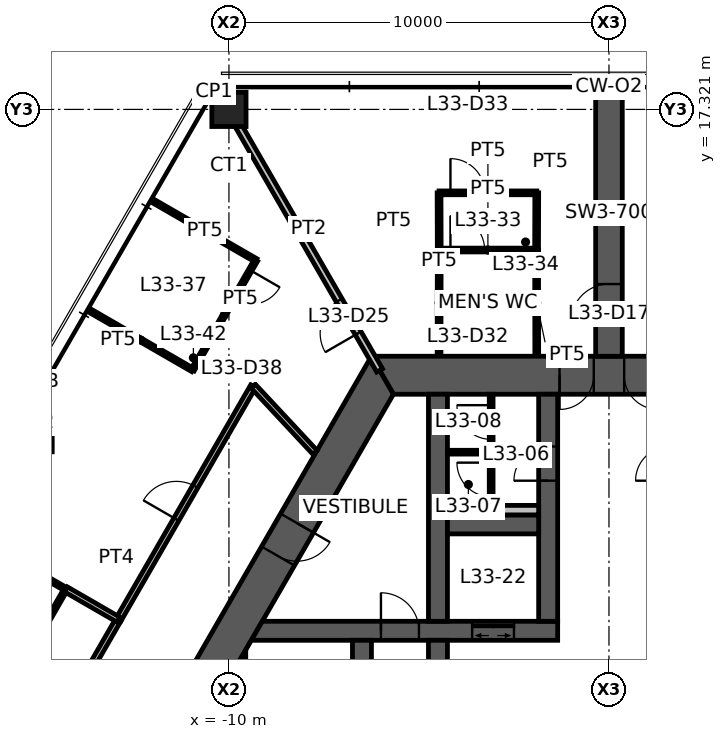
"""IFC4 building model, lengths in metres.
Left out: names, types, materials, properties, quantities, classifications, styles, units other than length and angle.
Written with IfcOpenShell. Run it as: python <this file> out.ifc"""

import sys

from ifc_helpers import new_model, si_unit, direction, frame, frame_2d, origin, origin_2d, place, context, subcontext, project, spatial, polyline, rectangle, hollow_rectangle, outline, extrude, element, fill, save


model = new_model("IFC4")
c1 = context("Model", 3, precision=1e-05, world=origin(), true_north=direction((0.0, 1.0)))
c2 = subcontext(c1, "Body", "Model", "MODEL_VIEW")
j1 = project(units=[si_unit("LENGTHUNIT", "METRE"), si_unit("PLANEANGLEUNIT", "RADIAN")], contexts=[c1])
p1 = place(None, origin())
s1 = spatial("IfcSite", under=j1, at=p1, CompositionType="ELEMENT")
p2 = place(p1, origin())
s2 = spatial("IfcBuilding", under=s1, at=p2, CompositionType="ELEMENT")
p3 = place(p2, frame((0.0, 0.0, 133.1)))
s3 = spatial("IfcBuildingStorey", under=s2, at=p3, CompositionType="ELEMENT", Elevation=133.1)
p4 = place(p3, frame((-10.0, 17.321, 0.0), z_axis=(0.0, 0.0, 1.0), x_axis=(1.0, 0.0, 0.0)))
e1 = element("IfcColumn", 1, at=p4, inside=s3, PredefinedType="COLUMN", context=c2, shape_type="SweptSolid", body=[
    extrude(hollow_rectangle(XDim=0.9, YDim=0.9, WallThickness=0.07, at=origin_2d()), origin(), (0.0, 0.0, 1.0), 3.9),
])
p5 = place(p3, frame((5.961, 10.325, 0.0), z_axis=(0.0, 0.0, 1.0), x_axis=(-1.0, 0.0, 0.0)))
e2 = element("IfcWall", 2, at=p5, inside=s3, PredefinedType="SHEAR", context=c2, shape_type="SweptSolid", body=[
    extrude(outline(polyline([(-0.289, -0.5), (4.661, -0.5), (5.561, -0.5), (6.361, -0.5), (7.261, -0.5), (12.211, -0.5), (11.634, 0.5), (7.261, 0.5), (6.361, 0.5), (5.561, 0.5), (4.661, 0.5), (0.289, 0.5), (-0.289, -0.5)])), origin(), (0.0, 0.0, 1.0), 3.9),
])
p6 = place(p5, frame((6.361, 0.0, 0.0)))
e3 = element("IfcOpeningElement", 3, at=p6, cuts=e2, PredefinedType="OPENING", context=c2, shape_type="SweptSolid", body=[
    extrude(rectangle(XDim=0.9, YDim=2.1, at=frame_2d((0.45, 1.05))), frame((0.0, 0.51, 0.0), z_axis=(0.0, -1.0, 0.0), x_axis=(1.0, 0.0, 0.0)), (0.0, 0.0, 1.0), 1.02),
])
p7 = place(p5, frame((4.661, 0.0, 0.0)))
e4 = element("IfcOpeningElement", 4, at=p7, cuts=e2, PredefinedType="OPENING", context=c2, shape_type="SweptSolid", body=[
    extrude(rectangle(XDim=0.9, YDim=2.1, at=frame_2d((0.45, 1.05))), frame((0.0, 0.51, 0.0), z_axis=(0.0, -1.0, 0.0), x_axis=(1.0, 0.0, 0.0)), (0.0, 0.0, 1.0), 1.02),
])
p8 = place(p3, frame((-5.961, 10.325, 0.0), z_axis=(0.0, 0.0, 1.0), x_axis=(-0.500004296715, -0.866022923061, 0.0)))
e5 = element("IfcWall", 5, at=p8, inside=s3, PredefinedType="SHEAR", context=c2, shape_type="SweptSolid", body=[
    extrude(outline(polyline([(-0.289, -0.5), (4.494, -0.5), (5.494, -0.5), (12.211, -0.5), (11.634, 0.5), (5.494, 0.5), (4.494, 0.5), (0.289, 0.5), (-0.289, -0.5)])), origin(), (0.0, 0.0, 1.0), 3.9),
])
p9 = place(p8, frame((4.494, 0.0, 0.0)))
e6 = element("IfcOpeningElement", 6, at=p9, cuts=e5, PredefinedType="OPENING", context=c2, shape_type="SweptSolid", body=[
    extrude(rectangle(XDim=1.0, YDim=2.1, at=frame_2d((0.5, 1.05))), frame((0.0, 0.51, 0.0), z_axis=(0.0, -1.0, 0.0), x_axis=(1.0, 0.0, 0.0)), (0.0, 0.0, 1.0), 1.02),
])
p10 = place(p3, frame((0.0, 10.825, 0.0), z_axis=(0.0, 0.0, 1.0), x_axis=(0.0, 1.0, 0.0)))
e7 = element("IfcWall", 7, at=p10, inside=s3, PredefinedType="SHEAR", context=c2, shape_type="SweptSolid", body=[
    extrude(rectangle(XDim=6.946, YDim=0.7, at=frame_2d((3.473, 0.0))), origin(), (0.0, 0.0, 1.0), 3.9),
])
p11 = place(p10, frame((0.9, 0.0, 0.0)))
e8 = element("IfcOpeningElement", 8, at=p11, cuts=e7, PredefinedType="OPENING", context=c2, shape_type="SweptSolid", body=[
    extrude(rectangle(XDim=1.0, YDim=2.1, at=frame_2d((0.5, 1.05))), frame((0.0, 0.36, 0.0), z_axis=(0.0, -1.0, 0.0), x_axis=(1.0, 0.0, 0.0)), (0.0, 0.0, 1.0), 0.72),
])
p12 = place(p3, frame((-9.266, 3.6, 0.0), z_axis=(0.0, 0.0, 1.0), x_axis=(1.0, 0.0, 0.0)))
e9 = element("IfcWall", 9, at=p12, inside=s3, PredefinedType="SHEAR", context=c2, shape_type="SweptSolid", body=[
    extrude(outline(polyline([(-0.144, -0.25), (3.266, -0.25), (4.266, -0.25), (5.667, -0.25), (6.767, -0.25), (7.916, -0.25), (7.916, 0.25), (6.767, 0.25), (5.667, 0.25), (4.266, 0.25), (3.266, 0.25), (0.144, 0.25), (-0.144, -0.25)])), origin(), (0.0, 0.0, 1.0), 3.9),
])
p13 = place(p12, frame((3.266, 0.0, 0.0)))
e10 = element("IfcOpeningElement", 10, at=p13, cuts=e9, PredefinedType="OPENING", context=c2, shape_type="SweptSolid", body=[
    extrude(rectangle(XDim=1.0, YDim=2.1, at=frame_2d((0.5, 1.05))), frame((0.0, 0.26, 0.0), z_axis=(0.0, -1.0, 0.0), x_axis=(1.0, 0.0, 0.0)), (0.0, 0.0, 1.0), 0.52),
])
p14 = place(p12, frame((5.667, 0.0, 0.0)))
e11 = element("IfcOpeningElement", 11, at=p14, cuts=e9, PredefinedType="OPENING", context=c2, shape_type="SweptSolid", body=[
    extrude(rectangle(XDim=1.1, YDim=2.1, at=frame_2d((0.55, 1.05))), frame((0.0, 0.26, 0.0), z_axis=(0.0, -1.0, 0.0), x_axis=(1.0, 0.0, 0.0)), (0.0, 0.0, 1.0), 0.52),
])
p15 = place(p3, frame((-1.6, 3.85, 0.0), z_axis=(0.0, 0.0, 1.0), x_axis=(0.0, 1.0, 0.0)))
e12 = element("IfcWall", 12, at=p15, inside=s3, PredefinedType="SHEAR", context=c2, shape_type="SweptSolid", body=[
    extrude(rectangle(XDim=5.975, YDim=0.5, at=frame_2d((2.987, 0.0))), origin(), (0.0, 0.0, 1.0), 3.9),
])
p16 = place(p15, frame((3.7, 0.0, 0.0)))
e13 = element("IfcOpeningElement", 13, at=p16, cuts=e12, PredefinedType="OPENING", context=c2, shape_type="SweptSolid", body=[
    extrude(rectangle(XDim=0.9, YDim=2.1, at=frame_2d((0.45, 1.05))), frame((0.0, 0.26, 0.0), z_axis=(0.0, -1.0, 0.0), x_axis=(1.0, 0.0, 0.0)), (0.0, 0.0, 1.0), 0.52),
])
p17 = place(p3, frame((-4.5, -3.35, 0.0), z_axis=(0.0, 0.0, 1.0), x_axis=(0.0, 1.0, 0.0)))
e14 = element("IfcWall", 14, at=p17, inside=s3, PredefinedType="SHEAR", context=c2, shape_type="SweptSolid", body=[
    extrude(rectangle(XDim=6.7, YDim=0.5, at=frame_2d((3.35, 0.0))), origin(), (0.0, 0.0, 1.0), 3.9),
])
p18 = place(p17, frame((2.85, 0.0, 0.0)))
e15 = element("IfcOpeningElement", 15, at=p18, cuts=e14, PredefinedType="OPENING", context=c2, shape_type="SweptSolid", body=[
    extrude(rectangle(XDim=1.0, YDim=2.1, at=frame_2d((0.5, 1.05))), frame((0.0, 0.26, 0.0), z_axis=(0.0, -1.0, 0.0), x_axis=(1.0, 0.0, 0.0)), (0.0, 0.0, 1.0), 0.52),
])
p19 = place(p3, frame((-6.5, -3.35, 0.0), z_axis=(0.0, 0.0, 1.0), x_axis=(0.0, 1.0, 0.0)))
e16 = element("IfcWall", 16, at=p19, inside=s3, PredefinedType="SHEAR", context=c2, shape_type="SweptSolid", body=[
    extrude(rectangle(XDim=6.7, YDim=0.5, at=frame_2d((3.35, 0.0))), origin(), (0.0, 0.0, 1.0), 3.9),
])
p20 = place(p19, frame((0.1, 0.0, 0.0)))
e17 = element("IfcOpeningElement", 17, at=p20, cuts=e16, PredefinedType="OPENING", context=c2, shape_type="SweptSolid", body=[
    extrude(rectangle(XDim=1.0, YDim=2.1, at=frame_2d((0.5, 1.05))), frame((0.0, 0.26, 0.0), z_axis=(0.0, -1.0, 0.0), x_axis=(1.0, 0.0, 0.0)), (0.0, 0.0, 1.0), 0.52),
])
p21 = place(p3, frame((-4.5, 3.85, 0.0), z_axis=(0.0, 0.0, 1.0), x_axis=(0.0, 1.0, 0.0)))
e18 = element("IfcWall", 18, at=p21, inside=s3, PredefinedType="SHEAR", context=c2, shape_type="SweptSolid", body=[
    extrude(rectangle(XDim=5.975, YDim=0.5, at=frame_2d((2.987, 0.0))), origin(), (0.0, 0.0, 1.0), 3.9),
])
p22 = place(p3, frame((-4.25, 6.4, 0.0), z_axis=(0.0, 0.0, 1.0), x_axis=(1.0, 0.0, 0.0)))
e19 = element("IfcWall", 19, at=p22, inside=s3, PredefinedType="SHEAR", context=c2, shape_type="SweptSolid", body=[
    extrude(rectangle(XDim=2.4, YDim=0.5, at=frame_2d((1.2, 0.0))), origin(), (0.0, 0.0, 1.0), 3.9),
])
p23 = place(p3, frame((-9.808, -2.662, 0.0), z_axis=(0.0, 0.0, 1.0), x_axis=(0.0, 1.0, 0.0)))
e20 = element("IfcWall", 20, at=p23, inside=s3, PredefinedType="SHEAR", context=c2, shape_type="SweptSolid", body=[
    extrude(outline(polyline([(-0.433, -0.25), (5.758, -0.25), (4.892, 0.25), (0.433, 0.25), (-0.433, -0.25)])), origin(), (0.0, 0.0, 1.0), 3.9),
])
p24 = place(p3, frame((-4.25, 6.775, 0.0), z_axis=(0.0, 0.0, 1.0), x_axis=(1.0, 0.0, 0.0)))
e21 = element("IfcWall", 21, at=p24, inside=s3, PredefinedType="PLUMBINGWALL", context=c2, shape_type="SweptSolid", body=[
    extrude(rectangle(XDim=2.4, YDim=0.25, at=frame_2d((1.2, 0.0))), origin(), (0.0, 0.0, 1.0), 3.9),
])
p25 = place(p3, frame((-3.1, 6.65, 0.0), z_axis=(0.0, 0.0, 1.0), x_axis=(0.0, 1.0, 0.0)))
e22 = element("IfcWall", 22, at=p25, inside=s3, PredefinedType="PARTITIONING", context=c2, shape_type="SweptSolid", body=[
    extrude(rectangle(XDim=3.175, YDim=0.1, at=frame_2d((1.587, 0.0))), origin(), (0.0, 0.0, 1.0), 2.95),
])
p26 = place(p25, frame((0.475, 0.0, 0.0)))
e23 = element("IfcOpeningElement", 23, at=p26, cuts=e22, PredefinedType="OPENING", context=c2, shape_type="SweptSolid", body=[
    extrude(rectangle(XDim=0.9, YDim=2.1, at=frame_2d((0.45, 1.05))), frame((0.0, 0.06, 0.0), z_axis=(0.0, -1.0, 0.0), x_axis=(1.0, 0.0, 0.0)), (0.0, 0.0, 1.0), 0.12),
])
p27 = place(p25, frame((1.988, 0.0, 0.0)))
e24 = element("IfcOpeningElement", 24, at=p27, cuts=e22, PredefinedType="OPENING", context=c2, shape_type="SweptSolid", body=[
    extrude(rectangle(XDim=0.9, YDim=2.1, at=frame_2d((0.45, 1.05))), frame((0.0, 0.06, 0.0), z_axis=(0.0, -1.0, 0.0), x_axis=(1.0, 0.0, 0.0)), (0.0, 0.0, 1.0), 0.12),
])
p28 = place(p3, frame((-3.15, 8.3, 0.0), z_axis=(0.0, 0.0, 1.0), x_axis=(-1.0, 0.0, 0.0)))
e25 = element("IfcWall", 25, at=p28, inside=s3, PredefinedType="PARTITIONING", context=c2, shape_type="SweptSolid", body=[
    extrude(rectangle(XDim=1.1, YDim=0.1, at=frame_2d((0.55, 0.0))), origin(), (0.0, 0.0, 1.0), 2.95),
])
p29 = place(p3, frame((-6.035, 10.453, 0.0), z_axis=(0.0, 0.0, 1.0), x_axis=(-0.499989830942, 0.866031274813, 0.0)))
e26 = element("IfcWall", 26, at=p29, inside=s3, PredefinedType="PARTITIONING", context=c2, shape_type="SweptSolid", body=[
    extrude(rectangle(XDim=7.93, YDim=0.175, at=frame_2d((3.965, 0.0))), origin(), (0.0, 0.0, 1.0), 3.05),
])
p30 = place(p29, frame((1.13, 0.0, 0.0)))
e27 = element("IfcOpeningElement", 27, at=p30, cuts=e26, PredefinedType="OPENING", context=c2, shape_type="SweptSolid", body=[
    extrude(rectangle(XDim=1.0, YDim=2.1, at=frame_2d((0.5, 1.05))), frame((0.0, 0.098, 0.0), z_axis=(0.0, -1.0, 0.0), x_axis=(1.0, 0.0, 0.0)), (0.0, 0.0, 1.0), 0.195),
])
p31 = place(p3, frame((-4.471, 13.62, 0.0), z_axis=(0.0, 0.0, 1.0), x_axis=(1.0, 0.0, 0.0)))
e28 = element("IfcWall", 28, at=p31, inside=s3, PredefinedType="PARTITIONING", context=c2, shape_type="SweptSolid", body=[
    extrude(rectangle(XDim=2.571, YDim=0.1, at=frame_2d((1.286, 0.0))), origin(), (0.0, 0.0, 1.0), 2.95),
])
p32 = place(p31, frame((0.3, 0.0, 0.0)))
e29 = element("IfcOpeningElement", 29, at=p32, cuts=e28, PredefinedType="OPENING", context=c2, shape_type="SweptSolid", body=[
    extrude(rectangle(XDim=0.9, YDim=2.1, at=frame_2d((0.45, 1.05))), frame((0.0, 0.06, 0.0), z_axis=(0.0, -1.0, 0.0), x_axis=(1.0, 0.0, 0.0)), (0.0, 0.0, 1.0), 0.12),
])
for number, where, z_axis, x_axis in (
    (30, (-4.471, 10.845, 0.0), (0.0, 0.0, 1.0), (0.002, 1.0, 0.0)),
    (31, (-1.905, 13.625, 0.0), (0.0, 0.0, 1.0), (0.002, -1.0, 0.0)),
):
    element("IfcWall", number, at=place(p3, frame(where, z_axis=z_axis, x_axis=x_axis)), inside=s3, PredefinedType="PARTITIONING", context=c2, shape_type="SweptSolid", body=[
        extrude(rectangle(XDim=2.78, YDim=0.1, at=frame_2d((1.39, 0.0))), origin(), (0.0, 0.0, 1.0), 2.95),
    ])
p33 = place(p3, frame((-4.471, 15.125, 0.0), z_axis=(0.0, 0.0, 1.0), x_axis=(1.0, 0.0, 0.0)))
e32 = element("IfcWall", 32, at=p33, inside=s3, PredefinedType="PARTITIONING", context=c2, shape_type="SweptSolid", body=[
    extrude(rectangle(XDim=2.571, YDim=0.1, at=frame_2d((1.286, 0.0))), origin(), (0.0, 0.0, 1.0), 2.95),
])
p34 = place(p33, frame((0.3, 0.0, 0.0)))
e33 = element("IfcOpeningElement", 33, at=p34, cuts=e32, PredefinedType="OPENING", context=c2, shape_type="SweptSolid", body=[
    extrude(rectangle(XDim=0.9, YDim=2.1, at=frame_2d((0.45, 1.05))), frame((0.0, 0.06, 0.0), z_axis=(0.0, -1.0, 0.0), x_axis=(1.0, 0.0, 0.0)), (0.0, 0.0, 1.0), 0.12),
])
for number, where, z_axis, x_axis in (
    (34, (-4.466, 13.625, 0.0), (0.0, 0.0, 1.0), (-0.003, 1.0, 0.0)),
    (35, (-1.9, 15.125, 0.0), (0.0, 0.0, 1.0), (-0.003, -1.0, 0.0)),
):
    element("IfcWall", number, at=place(p3, frame(where, z_axis=z_axis, x_axis=x_axis)), inside=s3, PredefinedType="PARTITIONING", context=c2, shape_type="SweptSolid", body=[
        extrude(rectangle(XDim=1.5, YDim=0.1, at=frame_2d((0.75, 0.0))), origin(), (0.0, 0.0, 1.0), 2.95),
    ])
p35 = place(p3, frame((-15.156, 0.0, 0.0), z_axis=(0.0, 0.0, 1.0), x_axis=(0.500014848696, 0.866016830716, 0.0)))
e36 = element("IfcWall", 36, at=p35, inside=s3, PredefinedType="PARTITIONING", context=c2, shape_type="SweptSolid", body=[
    extrude(rectangle(XDim=4.505, YDim=0.15, at=frame_2d((2.252, 0.0))), origin(), (0.0, 0.0, 1.0), 2.95),
])
p36 = place(p3, frame((-12.908, 3.893, 0.0), z_axis=(0.0, 0.0, 1.0), x_axis=(0.500006411147, 0.866021702275, 0.0)))
e37 = element("IfcWall", 37, at=p36, inside=s3, PredefinedType="PARTITIONING", context=c2, shape_type="SweptSolid", body=[
    extrude(rectangle(XDim=7.095, YDim=0.15, at=frame_2d((3.548, 0.0))), origin(), (0.0, 0.0, 1.0), 2.95),
])
p37 = place(p36, frame((3.047, 0.0, 0.0)))
e38 = element("IfcOpeningElement", 38, at=p37, cuts=e37, PredefinedType="OPENING", context=c2, shape_type="SweptSolid", body=[
    extrude(rectangle(XDim=1.0, YDim=2.1, at=frame_2d((0.5, 1.05))), frame((0.0, 0.085, 0.0), z_axis=(0.0, -1.0, 0.0), x_axis=(1.0, 0.0, 0.0)), (0.0, 0.0, 1.0), 0.17),
])
p38 = place(p3, frame((-9.36, 10.038, 0.0), z_axis=(0.0, 0.0, 1.0), x_axis=(0.681997114248, -0.731354863358, 0.0)))
e39 = element("IfcWall", 39, at=p38, inside=s3, PredefinedType="PARTITIONING", context=c2, shape_type="SweptSolid", body=[
    extrude(outline(polyline([(0.0, -0.075), (2.384, -0.075), (2.384, 0.0), (2.382, 0.075), (0.0, 0.075), (0.0, -0.075)])), origin(), (0.0, 0.0, 1.0), 2.95),
])
p39 = place(p3, frame((-11.98, 14.902, 0.0), z_axis=(0.0, 0.0, 1.0), x_axis=(0.866042875753, -0.499969736442, 0.0)))
e40 = element("IfcWall", 40, at=p39, inside=s3, PredefinedType="PARTITIONING", context=c2, shape_type="SweptSolid", body=[
    extrude(rectangle(XDim=3.105, YDim=0.1, at=frame_2d((1.553, 0.0))), origin(), (0.0, 0.0, 1.0), 2.95),
])
p40 = place(p3, frame((-10.956, 10.465, 0.0), z_axis=(0.0, 0.0, 1.0), x_axis=(-0.866012296238, 0.500022702249, 0.0)))
e41 = element("IfcWall", 41, at=p40, inside=s3, PredefinedType="PARTITIONING", context=c2, shape_type="SweptSolid", body=[
    extrude(rectangle(XDim=3.144, YDim=0.1, at=frame_2d((1.572, 0.0))), origin(), (0.0, 0.0, 1.0), 2.95),
])
p41 = place(p3, frame((-9.291, 13.349, 0.0), z_axis=(0.0, 0.0, 1.0), x_axis=(-0.500033344505, -0.86600615147, 0.0)))
e42 = element("IfcWall", 42, at=p41, inside=s3, PredefinedType="PARTITIONING", context=c2, shape_type="SweptSolid", body=[
    extrude(rectangle(XDim=3.331, YDim=0.1, at=frame_2d((1.666, 0.0))), origin(), (0.0, 0.0, 1.0), 2.95),
])
p42 = place(p41, frame((0.3, 0.0, 0.0)))
e43 = element("IfcOpeningElement", 43, at=p42, cuts=e42, PredefinedType="OPENING", context=c2, shape_type="SweptSolid", body=[
    extrude(rectangle(XDim=0.9, YDim=2.1, at=frame_2d((0.45, 1.05))), frame((0.0, 0.06, 0.0), z_axis=(0.0, -1.0, 0.0), x_axis=(1.0, 0.0, 0.0)), (0.0, 0.0, 1.0), 0.12),
])
p43 = place(p3, frame((-14.291, 4.698, 0.0), z_axis=(0.0, 0.0, 1.0), x_axis=(-0.498809626432, -0.86671157635, 0.0)))
e44 = element("IfcWall", 44, at=p43, inside=s3, PredefinedType="PARTITIONING", context=c2, shape_type="SweptSolid", body=[
    extrude(rectangle(XDim=3.374, YDim=0.1, at=frame_2d((1.687, 0.0))), origin(), (0.0, 0.0, 1.0), 2.95),
])
p44 = place(p43, frame((2.131, 0.0, 0.0)))
e45 = element("IfcOpeningElement", 45, at=p44, cuts=e44, PredefinedType="OPENING", context=c2, shape_type="SweptSolid", body=[
    extrude(rectangle(XDim=0.9, YDim=2.1, at=frame_2d((0.45, 1.05))), frame((0.0, 0.06, 0.0), z_axis=(0.0, -1.0, 0.0), x_axis=(1.0, 0.0, 0.0)), (0.0, 0.0, 1.0), 0.12),
])
p45 = place(p3, frame((-16.976, 6.248, 0.0), z_axis=(0.0, 0.0, 1.0), x_axis=(0.865232439327, -0.501370946442, 0.0)))
e46 = element("IfcWall", 46, at=p45, inside=s3, PredefinedType="PARTITIONING", context=c2, shape_type="SweptSolid", body=[
    extrude(rectangle(XDim=3.105, YDim=0.1, at=frame_2d((1.553, 0.0))), origin(), (0.0, 0.0, 1.0), 2.95),
])
p46 = place(p3, frame((-14.289, 4.691, 0.0), z_axis=(0.0, 0.0, 1.0), x_axis=(0.865925490132, -0.500173015605, 0.0)))
e47 = element("IfcWall", 47, at=p46, inside=s3, PredefinedType="PARTITIONING", context=c2, shape_type="SweptSolid", body=[
    extrude(rectangle(XDim=1.595, YDim=0.15, at=frame_2d((0.797, 0.0))), origin(), (0.0, 0.0, 1.0), 2.95),
])
p47 = place(p3, frame((0.0, 17.771, 0.0), z_axis=(0.0, 0.0, 1.0), x_axis=(0.0, 1.0, 0.0)))
e48 = element("IfcWall", 48, at=p47, inside=s3, PredefinedType="PARTITIONING", context=c2, shape_type="SweptSolid", body=[
    extrude(rectangle(XDim=0.08, YDim=0.175, at=frame_2d((0.04, 0.0))), origin(), (0.0, 0.0, 1.0), 3.9),
])
p48 = place(p6, origin())
e49 = element("IfcDoor", 49, at=p48, inside=s3, OperationType="SINGLE_SWING_RIGHT", PredefinedType="DOOR", context=c2, shape_type="SweptSolid", body=[
    extrude(rectangle(XDim=0.9, YDim=2.1, at=frame_2d((0.45, 1.05))), frame((0.0, 0.025, 0.0), z_axis=(0.0, -1.0, 0.0), x_axis=(1.0, 0.0, 0.0)), (0.0, 0.0, 1.0), 0.05),
])
fill(e3, e49)
p49 = place(p7, origin())
e50 = element("IfcDoor", 50, at=p49, inside=s3, OperationType="SINGLE_SWING_LEFT", PredefinedType="DOOR", context=c2, shape_type="SweptSolid", body=[
    extrude(rectangle(XDim=0.9, YDim=2.1, at=frame_2d((0.45, 1.05))), frame((0.0, 0.025, 0.0), z_axis=(0.0, -1.0, 0.0), x_axis=(1.0, 0.0, 0.0)), (0.0, 0.0, 1.0), 0.05),
])
fill(e4, e50)
p50 = place(p9, origin())
e51 = element("IfcDoor", 51, at=p50, inside=s3, OperationType="SINGLE_SWING_LEFT", PredefinedType="DOOR", context=c2, shape_type="SweptSolid", body=[
    extrude(rectangle(XDim=1.0, YDim=2.1, at=frame_2d((0.5, 1.05))), frame((0.0, 0.025, 0.0), z_axis=(0.0, -1.0, 0.0), x_axis=(1.0, 0.0, 0.0)), (0.0, 0.0, 1.0), 0.05),
])
fill(e6, e51)
p51 = place(p13, origin())
e52 = element("IfcDoor", 52, at=p51, inside=s3, OperationType="SINGLE_SWING_LEFT", PredefinedType="DOOR", context=c2, shape_type="SweptSolid", body=[
    extrude(rectangle(XDim=1.0, YDim=2.1, at=frame_2d((0.5, 1.05))), frame((0.0, 0.025, 0.0), z_axis=(0.0, -1.0, 0.0), x_axis=(1.0, 0.0, 0.0)), (0.0, 0.0, 1.0), 0.05),
])
fill(e10, e52)
p52 = place(p16, origin())
e53 = element("IfcDoor", 53, at=p52, inside=s3, OperationType="SINGLE_SWING_LEFT", PredefinedType="DOOR", context=c2, shape_type="SweptSolid", body=[
    extrude(rectangle(XDim=0.9, YDim=2.1, at=frame_2d((0.45, 1.05))), frame((0.0, 0.025, 0.0), z_axis=(0.0, -1.0, 0.0), x_axis=(1.0, 0.0, 0.0)), (0.0, 0.0, 1.0), 0.05),
])
fill(e13, e53)
p53 = place(p11, origin())
e54 = element("IfcDoor", 54, at=p53, inside=s3, OperationType="SINGLE_SWING_LEFT", PredefinedType="DOOR", context=c2, shape_type="SweptSolid", body=[
    extrude(rectangle(XDim=1.0, YDim=2.1, at=frame_2d((0.5, 1.05))), frame((0.0, 0.025, 0.0), z_axis=(0.0, -1.0, 0.0), x_axis=(1.0, 0.0, 0.0)), (0.0, 0.0, 1.0), 0.05),
])
fill(e8, e54)
p54 = place(p26, origin())
e55 = element("IfcDoor", 55, at=p54, inside=s3, OperationType="SINGLE_SWING_RIGHT", PredefinedType="DOOR", context=c2, shape_type="SweptSolid", body=[
    extrude(rectangle(XDim=0.9, YDim=2.1, at=frame_2d((0.45, 1.05))), frame((0.0, 0.025, 0.0), z_axis=(0.0, -1.0, 0.0), x_axis=(1.0, 0.0, 0.0)), (0.0, 0.0, 1.0), 0.05),
])
fill(e23, e55)
p55 = place(p27, origin())
e56 = element("IfcDoor", 56, at=p55, inside=s3, OperationType="SINGLE_SWING_RIGHT", PredefinedType="DOOR", context=c2, shape_type="SweptSolid", body=[
    extrude(rectangle(XDim=0.9, YDim=2.1, at=frame_2d((0.45, 1.05))), frame((0.0, 0.025, 0.0), z_axis=(0.0, -1.0, 0.0), x_axis=(1.0, 0.0, 0.0)), (0.0, 0.0, 1.0), 0.05),
])
fill(e24, e56)
p56 = place(p30, origin())
e57 = element("IfcDoor", 57, at=p56, inside=s3, OperationType="SINGLE_SWING_LEFT", PredefinedType="DOOR", context=c2, shape_type="SweptSolid", body=[
    extrude(rectangle(XDim=1.0, YDim=2.1, at=frame_2d((0.5, 1.05))), frame((0.0, 0.025, 0.0), z_axis=(0.0, -1.0, 0.0), x_axis=(1.0, 0.0, 0.0)), (0.0, 0.0, 1.0), 0.05),
])
fill(e27, e57)
p57 = place(p32, origin())
e58 = element("IfcDoor", 58, at=p57, inside=s3, OperationType="SINGLE_SWING_LEFT", PredefinedType="DOOR", context=c2, shape_type="SweptSolid", body=[
    extrude(rectangle(XDim=0.9, YDim=2.1, at=frame_2d((0.45, 1.05))), frame((0.0, 0.025, 0.0), z_axis=(0.0, -1.0, 0.0), x_axis=(1.0, 0.0, 0.0)), (0.0, 0.0, 1.0), 0.05),
])
fill(e29, e58)
p58 = place(p34, origin())
e59 = element("IfcDoor", 59, at=p58, inside=s3, OperationType="SINGLE_SWING_LEFT", PredefinedType="DOOR", context=c2, shape_type="SweptSolid", body=[
    extrude(rectangle(XDim=0.9, YDim=2.1, at=frame_2d((0.45, 1.05))), frame((0.0, 0.025, 0.0), z_axis=(0.0, -1.0, 0.0), x_axis=(1.0, 0.0, 0.0)), (0.0, 0.0, 1.0), 0.05),
])
fill(e33, e59)
p59 = place(p37, origin())
e60 = element("IfcDoor", 60, at=p59, inside=s3, OperationType="SINGLE_SWING_LEFT", PredefinedType="DOOR", context=c2, shape_type="SweptSolid", body=[
    extrude(rectangle(XDim=1.0, YDim=2.1, at=frame_2d((0.5, 1.05))), frame((0.0, 0.025, 0.0), z_axis=(0.0, -1.0, 0.0), x_axis=(1.0, 0.0, 0.0)), (0.0, 0.0, 1.0), 0.05),
])
fill(e38, e60)
p60 = place(p42, origin())
e61 = element("IfcDoor", 61, at=p60, inside=s3, OperationType="SINGLE_SWING_LEFT", PredefinedType="DOOR", context=c2, shape_type="SweptSolid", body=[
    extrude(rectangle(XDim=0.9, YDim=2.1, at=frame_2d((0.45, 1.05))), frame((0.0, 0.025, 0.0), z_axis=(0.0, -1.0, 0.0), x_axis=(1.0, 0.0, 0.0)), (0.0, 0.0, 1.0), 0.05),
])
fill(e43, e61)
p61 = place(p14, origin())
e62 = element("IfcDoor", 62, at=p61, inside=s3, OperationType="DOUBLE_DOOR_SLIDING", PredefinedType="DOOR", context=c2, shape_type="SweptSolid", body=[
    extrude(rectangle(XDim=1.1, YDim=2.1, at=frame_2d((0.55, 1.05))), frame((0.0, 0.025, 0.0), z_axis=(0.0, -1.0, 0.0), x_axis=(1.0, 0.0, 0.0)), (0.0, 0.0, 1.0), 0.05),
])
fill(e11, e62)
save(model, sys.argv[1])
